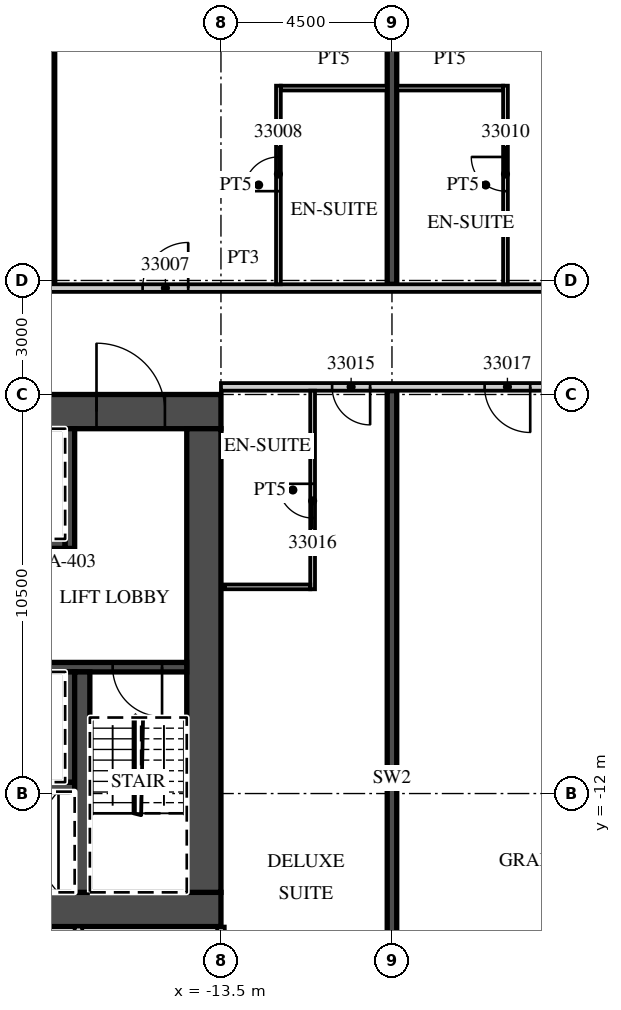
"""IFC4 building model, lengths in metres.
Left out: names, types, materials, properties, quantities, classifications, styles, units other than length and angle.
Written with IfcOpenShell. Run it as: python <this file> out.ifc"""

import sys

from ifc_helpers import new_model, si_unit, direction, frame, frame_2d, origin, place, context, subcontext, project, spatial, rectangle, extrude, element, fill, save


model = new_model("IFC4")
c1 = context("Model", 3, precision=1e-05, world=origin(), true_north=direction((0.0, 1.0)))
c2 = subcontext(c1, "Body", "Model", "MODEL_VIEW")
j1 = project(units=[si_unit("LENGTHUNIT", "METRE"), si_unit("PLANEANGLEUNIT", "RADIAN")], contexts=[c1])
p1 = place(None, origin())
s1 = spatial("IfcSite", under=j1, at=p1, CompositionType="ELEMENT")
p2 = place(p1, origin())
s2 = spatial("IfcBuilding", under=s1, at=p2, CompositionType="ELEMENT")
p3 = place(p2, frame((0.0, 0.0, 143.8)))
s3 = spatial("IfcBuildingStorey", under=s2, at=p3, CompositionType="ELEMENT", Elevation=143.8)
p4 = place(p3, frame((-18.0, 1.4, 0.0), z_axis=(0.0, 0.0, 1.0), x_axis=(0.0, 1.0, 0.0)))
e1 = element("IfcWall", 1, at=p4, inside=s3, PredefinedType="SHEAR", context=c2, shape_type="SweptSolid", body=[
    extrude(rectangle(XDim=18.207, YDim=0.25, at=frame_2d((9.104, 0.0))), origin(), (0.0, 0.0, 1.0), 3.3),
])
p5 = place(p3, frame((-9.0, -21.777, 0.0), z_axis=(0.0, 0.0, 1.0), x_axis=(0.0, 1.0, 0.0)))
e2 = element("IfcWall", 2, at=p5, inside=s3, PredefinedType="SHEAR", context=c2, shape_type="SweptSolid", body=[
    extrude(rectangle(XDim=20.377, YDim=0.25, at=frame_2d((10.188, 0.0))), origin(), (0.0, 0.0, 1.0), 3.3),
])
p6 = place(p3, frame((-9.0, 1.4, 0.0), z_axis=(0.0, 0.0, 1.0), x_axis=(0.0, 1.0, 0.0)))
e3 = element("IfcWall", 3, at=p6, inside=s3, PredefinedType="SHEAR", context=c2, shape_type="SweptSolid", body=[
    extrude(rectangle(XDim=19.073, YDim=0.25, at=frame_2d((9.537, 0.0))), origin(), (0.0, 0.0, 1.0), 3.3),
])
p7 = place(p3, frame((-13.5, -22.232, 0.0), z_axis=(0.0, 0.0, 1.0), x_axis=(0.0, 1.0, 0.0)))
e4 = element("IfcWall", 4, at=p7, inside=s3, PredefinedType="PARTITIONING", context=c2, shape_type="SweptSolid", body=[
    extrude(rectangle(XDim=6.732, YDim=0.2, at=frame_2d((3.366, 0.0))), origin(), (0.0, 0.0, 1.0), 3.02),
])
p8 = place(p3, frame((-39.316, 1.3, 0.0), z_axis=(0.0, 0.0, 1.0), x_axis=(1.0, 0.0, 0.0)))
e5 = element("IfcWall", 5, at=p8, inside=s3, PredefinedType="PARTITIONING", context=c2, shape_type="SweptSolid", body=[
    extrude(rectangle(XDim=52.816, YDim=0.2, at=frame_2d((26.408, 0.0))), origin(), (0.0, 0.0, 1.0), 3.02),
])
p9 = place(p8, frame((0.15, 0.0, 0.0)))
e6 = element("IfcOpeningElement", 6, at=p9, cuts=e5, PredefinedType="OPENING", context=c2, shape_type="SweptSolid", body=[
    extrude(rectangle(XDim=0.9, YDim=2.1, at=frame_2d((0.45, 1.05))), frame((0.0, 0.11, 0.0), z_axis=(0.0, -1.0, 0.0), x_axis=(1.0, 0.0, 0.0)), (0.0, 0.0, 1.0), 0.22),
])
p10 = place(p8, frame((5.754, 0.0, 0.0)))
e7 = element("IfcOpeningElement", 7, at=p10, cuts=e5, PredefinedType="OPENING", context=c2, shape_type="SweptSolid", body=[
    extrude(rectangle(XDim=1.2, YDim=2.1, at=frame_2d((0.6, 1.05))), frame((0.0, 0.11, 0.0), z_axis=(0.0, -1.0, 0.0), x_axis=(1.0, 0.0, 0.0)), (0.0, 0.0, 1.0), 0.22),
])
p11 = place(p8, frame((14.754, 0.0, 0.0)))
e8 = element("IfcOpeningElement", 8, at=p11, cuts=e5, PredefinedType="OPENING", context=c2, shape_type="SweptSolid", body=[
    extrude(rectangle(XDim=1.2, YDim=2.1, at=frame_2d((0.6, 1.05))), frame((0.0, 0.11, 0.0), z_axis=(0.0, -1.0, 0.0), x_axis=(1.0, 0.0, 0.0)), (0.0, 0.0, 1.0), 0.22),
])
p12 = place(p8, frame((23.754, 0.0, 0.0)))
e9 = element("IfcOpeningElement", 9, at=p12, cuts=e5, PredefinedType="OPENING", context=c2, shape_type="SweptSolid", body=[
    extrude(rectangle(XDim=1.2, YDim=2.1, at=frame_2d((0.6, 1.05))), frame((0.0, 0.11, 0.0), z_axis=(0.0, -1.0, 0.0), x_axis=(1.0, 0.0, 0.0)), (0.0, 0.0, 1.0), 0.22),
])
p13 = place(p8, frame((35.678, 0.0, 0.0)))
e10 = element("IfcOpeningElement", 10, at=p13, cuts=e5, PredefinedType="OPENING", context=c2, shape_type="SweptSolid", body=[
    extrude(rectangle(XDim=1.2, YDim=2.1, at=frame_2d((0.6, 1.05))), frame((0.0, 0.11, 0.0), z_axis=(0.0, -1.0, 0.0), x_axis=(1.0, 0.0, 0.0)), (0.0, 0.0, 1.0), 0.22),
])
p14 = place(p8, frame((44.678, 0.0, 0.0)))
e11 = element("IfcOpeningElement", 11, at=p14, cuts=e5, PredefinedType="OPENING", context=c2, shape_type="SweptSolid", body=[
    extrude(rectangle(XDim=1.2, YDim=2.1, at=frame_2d((0.6, 1.05))), frame((0.0, 0.11, 0.0), z_axis=(0.0, -1.0, 0.0), x_axis=(1.0, 0.0, 0.0)), (0.0, 0.0, 1.0), 0.22),
])
p15 = place(p8, frame((51.241, 0.0, 0.0)))
e12 = element("IfcOpeningElement", 12, at=p15, cuts=e5, PredefinedType="OPENING", context=c2, shape_type="SweptSolid", body=[
    extrude(rectangle(XDim=1.0, YDim=2.1, at=frame_2d((0.5, 1.05))), frame((0.0, 0.11, 0.0), z_axis=(0.0, -1.0, 0.0), x_axis=(1.0, 0.0, 0.0)), (0.0, 0.0, 1.0), 0.22),
])
p16 = place(p3, frame((-11.988, 1.4, 0.0), z_axis=(0.0, 0.0, 1.0), x_axis=(0.0, 1.0, 0.0)))
e13 = element("IfcWall", 13, at=p16, inside=s3, PredefinedType="PARTITIONING", context=c2, shape_type="SweptSolid", body=[
    extrude(rectangle(XDim=5.225, YDim=0.125, at=frame_2d((2.613, 0.0))), origin(), (0.0, 0.0, 1.0), 3.02),
])
p17 = place(p16, frame((2.45, 0.0, 0.0)))
e14 = element("IfcOpeningElement", 14, at=p17, cuts=e13, PredefinedType="OPENING", context=c2, shape_type="SweptSolid", body=[
    extrude(rectangle(XDim=0.9, YDim=2.1, at=frame_2d((0.45, 1.05))), frame((0.0, 0.073, 0.0), z_axis=(0.0, -1.0, 0.0), x_axis=(1.0, 0.0, 0.0)), (0.0, 0.0, 1.0), 0.145),
])
p18 = place(p3, frame((-11.925, 6.562, 0.0), z_axis=(0.0, 0.0, 1.0), x_axis=(1.0, 0.0, 0.0)))
e15 = element("IfcWall", 15, at=p18, inside=s3, PredefinedType="PARTITIONING", context=c2, shape_type="SweptSolid", body=[
    extrude(rectangle(XDim=2.8, YDim=0.125, at=frame_2d((1.4, 0.0))), origin(), (0.0, 0.0, 1.0), 3.02),
])
p19 = place(p3, frame((-6.013, 1.4, 0.0), z_axis=(0.0, 0.0, 1.0), x_axis=(0.0, 1.0, 0.0)))
e16 = element("IfcWall", 16, at=p19, inside=s3, PredefinedType="PARTITIONING", context=c2, shape_type="SweptSolid", body=[
    extrude(rectangle(XDim=5.225, YDim=0.125, at=frame_2d((2.613, 0.0))), origin(), (0.0, 0.0, 1.0), 3.02),
])
p20 = place(p19, frame((2.45, 0.0, 0.0)))
e17 = element("IfcOpeningElement", 17, at=p20, cuts=e16, PredefinedType="OPENING", context=c2, shape_type="SweptSolid", body=[
    extrude(rectangle(XDim=0.9, YDim=2.1, at=frame_2d((0.45, 1.05))), frame((0.0, 0.073, 0.0), z_axis=(0.0, -1.0, 0.0), x_axis=(1.0, 0.0, 0.0)), (0.0, 0.0, 1.0), 0.145),
])
p21 = place(p3, frame((-8.875, 6.562, 0.0), z_axis=(0.0, 0.0, 1.0), x_axis=(1.0, 0.0, 0.0)))
e18 = element("IfcWall", 18, at=p21, inside=s3, PredefinedType="PARTITIONING", context=c2, shape_type="SweptSolid", body=[
    extrude(rectangle(XDim=2.8, YDim=0.125, at=frame_2d((1.4, 0.0))), origin(), (0.0, 0.0, 1.0), 3.02),
])
p22 = place(p3, frame((-13.5, -1.3, 0.0), z_axis=(0.0, 0.0, 1.0), x_axis=(1.0, 0.0, 0.0)))
e19 = element("IfcWall", 19, at=p22, inside=s3, PredefinedType="PARTITIONING", context=c2, shape_type="SweptSolid", body=[
    extrude(rectangle(XDim=60.932, YDim=0.2, at=frame_2d((30.466, 0.0))), origin(), (0.0, 0.0, 1.0), 3.02),
])
p23 = place(p22, frame((2.925, 0.0, 0.0)))
e20 = element("IfcOpeningElement", 20, at=p23, cuts=e19, PredefinedType="OPENING", context=c2, shape_type="SweptSolid", body=[
    extrude(rectangle(XDim=1.0, YDim=2.1, at=frame_2d((0.5, 1.05))), frame((0.0, 0.11, 0.0), z_axis=(0.0, -1.0, 0.0), x_axis=(1.0, 0.0, 0.0)), (0.0, 0.0, 1.0), 0.22),
])
p24 = place(p22, frame((6.938, 0.0, 0.0)))
e21 = element("IfcOpeningElement", 21, at=p24, cuts=e19, PredefinedType="OPENING", context=c2, shape_type="SweptSolid", body=[
    extrude(rectangle(XDim=1.2, YDim=2.1, at=frame_2d((0.6, 1.05))), frame((0.0, 0.11, 0.0), z_axis=(0.0, -1.0, 0.0), x_axis=(1.0, 0.0, 0.0)), (0.0, 0.0, 1.0), 0.22),
])
p25 = place(p22, frame((15.938, 0.0, 0.0)))
e22 = element("IfcOpeningElement", 22, at=p25, cuts=e19, PredefinedType="OPENING", context=c2, shape_type="SweptSolid", body=[
    extrude(rectangle(XDim=1.2, YDim=2.1, at=frame_2d((0.6, 1.05))), frame((0.0, 0.11, 0.0), z_axis=(0.0, -1.0, 0.0), x_axis=(1.0, 0.0, 0.0)), (0.0, 0.0, 1.0), 0.22),
])
p26 = place(p22, frame((24.938, 0.0, 0.0)))
e23 = element("IfcOpeningElement", 23, at=p26, cuts=e19, PredefinedType="OPENING", context=c2, shape_type="SweptSolid", body=[
    extrude(rectangle(XDim=1.2, YDim=2.1, at=frame_2d((0.6, 1.05))), frame((0.0, 0.11, 0.0), z_axis=(0.0, -1.0, 0.0), x_axis=(1.0, 0.0, 0.0)), (0.0, 0.0, 1.0), 0.22),
])
p27 = place(p22, frame((32.075, 0.0, 0.0)))
e24 = element("IfcOpeningElement", 24, at=p27, cuts=e19, PredefinedType="OPENING", context=c2, shape_type="SweptSolid", body=[
    extrude(rectangle(XDim=1.0, YDim=2.1, at=frame_2d((0.5, 1.05))), frame((0.0, 0.11, 0.0), z_axis=(0.0, -1.0, 0.0), x_axis=(1.0, 0.0, 0.0)), (0.0, 0.0, 1.0), 0.22),
])
p28 = place(p22, frame((36.55, 0.0, 0.0)))
e25 = element("IfcOpeningElement", 25, at=p28, cuts=e19, PredefinedType="OPENING", context=c2, shape_type="SweptSolid", body=[
    extrude(rectangle(XDim=1.0, YDim=2.1, at=frame_2d((0.5, 1.05))), frame((0.0, 0.11, 0.0), z_axis=(0.0, -1.0, 0.0), x_axis=(1.0, 0.0, 0.0)), (0.0, 0.0, 1.0), 0.22),
])
p29 = place(p22, frame((42.938, 0.0, 0.0)))
e26 = element("IfcOpeningElement", 26, at=p29, cuts=e19, PredefinedType="OPENING", context=c2, shape_type="SweptSolid", body=[
    extrude(rectangle(XDim=1.2, YDim=2.1, at=frame_2d((0.6, 1.05))), frame((0.0, 0.11, 0.0), z_axis=(0.0, -1.0, 0.0), x_axis=(1.0, 0.0, 0.0)), (0.0, 0.0, 1.0), 0.22),
])
p30 = place(p22, frame((52.425, 0.0, 0.0)))
e27 = element("IfcOpeningElement", 27, at=p30, cuts=e19, PredefinedType="OPENING", context=c2, shape_type="SweptSolid", body=[
    extrude(rectangle(XDim=1.0, YDim=2.1, at=frame_2d((0.5, 1.05))), frame((0.0, 0.11, 0.0), z_axis=(0.0, -1.0, 0.0), x_axis=(1.0, 0.0, 0.0)), (0.0, 0.0, 1.0), 0.22),
])
p31 = place(p22, frame((58.316, 0.0, 0.0)))
e28 = element("IfcOpeningElement", 28, at=p31, cuts=e19, PredefinedType="OPENING", context=c2, shape_type="SweptSolid", body=[
    extrude(rectangle(XDim=1.2, YDim=2.1, at=frame_2d((0.6, 1.05))), frame((0.0, 0.11, 0.0), z_axis=(0.0, -1.0, 0.0), x_axis=(1.0, 0.0, 0.0)), (0.0, 0.0, 1.0), 0.22),
])
p32 = place(p3, frame((-11.088, -6.625, 0.0), z_axis=(0.0, 0.0, 1.0), x_axis=(0.0, 1.0, 0.0)))
e29 = element("IfcWall", 29, at=p32, inside=s3, PredefinedType="PARTITIONING", context=c2, shape_type="SweptSolid", body=[
    extrude(rectangle(XDim=5.225, YDim=0.125, at=frame_2d((2.613, 0.0))), origin(), (0.0, 0.0, 1.0), 3.02),
])
p33 = place(p32, frame((1.875, 0.0, 0.0)))
e30 = element("IfcOpeningElement", 30, at=p33, cuts=e29, PredefinedType="OPENING", context=c2, shape_type="SweptSolid", body=[
    extrude(rectangle(XDim=0.9, YDim=2.1, at=frame_2d((0.45, 1.05))), frame((0.0, 0.073, 0.0), z_axis=(0.0, -1.0, 0.0), x_axis=(1.0, 0.0, 0.0)), (0.0, 0.0, 1.0), 0.145),
])
p34 = place(p3, frame((-13.4, -6.562, 0.0), z_axis=(0.0, 0.0, 1.0), x_axis=(1.0, 0.0, 0.0)))
e31 = element("IfcWall", 31, at=p34, inside=s3, PredefinedType="PARTITIONING", context=c2, shape_type="SweptSolid", body=[
    extrude(rectangle(XDim=2.25, YDim=0.125, at=frame_2d((1.125, 0.0))), origin(), (0.0, 0.0, 1.0), 3.02),
])
p35 = place(p3, frame((-31.5, -1.95, 0.0), z_axis=(0.0, 0.0, 1.0), x_axis=(1.0, 0.0, 0.0)))
e32 = element("IfcWall", 32, at=p35, inside=s3, PredefinedType="SHEAR", context=c2, shape_type="SweptSolid", body=[
    extrude(rectangle(XDim=18.0, YDim=0.9, at=frame_2d((9.0, 0.0))), origin(), (0.0, 0.0, 1.0), 3.02),
])
p36 = place(p35, frame((14.725, 0.0, 0.0)))
e33 = element("IfcOpeningElement", 33, at=p36, cuts=e32, PredefinedType="OPENING", context=c2, shape_type="SweptSolid", body=[
    extrude(rectangle(XDim=1.8, YDim=2.1, at=frame_2d((0.9, 1.05))), frame((0.0, 0.46, 0.0), z_axis=(0.0, -1.0, 0.0), x_axis=(1.0, 0.0, 0.0)), (0.0, 0.0, 1.0), 0.92),
])
p37 = place(p3, frame((-20.3, -15.05, 0.0), z_axis=(0.0, 0.0, 1.0), x_axis=(1.0, 0.0, 0.0)))
e34 = element("IfcWall", 34, at=p37, inside=s3, PredefinedType="SHEAR", context=c2, shape_type="SweptSolid", body=[
    extrude(rectangle(XDim=6.8, YDim=0.9, at=frame_2d((3.4, 0.0))), origin(), (0.0, 0.0, 1.0), 3.02),
])
p38 = place(p37, frame((0.875, 0.0, 0.0)))
e35 = element("IfcOpeningElement", 35, at=p38, cuts=e34, PredefinedType="OPENING", context=c2, shape_type="SweptSolid", body=[
    extrude(rectangle(XDim=1.2, YDim=2.1, at=frame_2d((0.6, 1.05))), frame((0.0, 0.46, 0.0), z_axis=(0.0, -1.0, 0.0), x_axis=(1.0, 0.0, 0.0)), (0.0, 0.0, 1.0), 0.92),
])
p39 = place(p3, frame((-13.95, -14.6, 0.0), z_axis=(0.0, 0.0, 1.0), x_axis=(0.0, 1.0, 0.0)))
e36 = element("IfcWall", 36, at=p39, inside=s3, PredefinedType="SHEAR", context=c2, shape_type="SweptSolid", body=[
    extrude(rectangle(XDim=12.2, YDim=0.9, at=frame_2d((6.1, 0.0))), origin(), (0.0, 0.0, 1.0), 3.02),
])
p40 = place(p3, frame((-30.6, -5.425, 0.0), z_axis=(0.0, 0.0, 1.0), x_axis=(1.0, 0.0, 0.0)))
e37 = element("IfcWall", 37, at=p40, inside=s3, PredefinedType="SHEAR", context=c2, shape_type="SweptSolid", body=[
    extrude(rectangle(XDim=13.0, YDim=0.25, at=frame_2d((6.5, 0.0))), origin(), (0.0, 0.0, 1.0), 3.02),
])
p41 = place(p3, frame((-17.475, -5.55, 0.0), z_axis=(0.0, 0.0, 1.0), x_axis=(0.0, 1.0, 0.0)))
e38 = element("IfcWall", 38, at=p41, inside=s3, PredefinedType="SHEAR", context=c2, shape_type="SweptSolid", body=[
    extrude(rectangle(XDim=3.15, YDim=0.25, at=frame_2d((1.575, 0.0))), origin(), (0.0, 0.0, 1.0), 3.02),
])
p42 = place(p3, frame((-30.6, -8.675, 0.0), z_axis=(0.0, 0.0, 1.0), x_axis=(1.0, 0.0, 0.0)))
e39 = element("IfcWall", 39, at=p42, inside=s3, PredefinedType="SHEAR", context=c2, shape_type="SweptSolid", body=[
    extrude(rectangle(XDim=16.2, YDim=0.25, at=frame_2d((8.1, 0.0))), origin(), (0.0, 0.0, 1.0), 3.02),
])
p43 = place(p42, frame((0.6, 0.0, 0.0)))
e40 = element("IfcOpeningElement", 40, at=p43, cuts=e39, PredefinedType="OPENING", context=c2, shape_type="SweptSolid", body=[
    extrude(rectangle(XDim=1.2, YDim=2.1, at=frame_2d((0.6, 1.05))), frame((0.0, 0.135, 0.0), z_axis=(0.0, -1.0, 0.0), x_axis=(1.0, 0.0, 0.0)), (0.0, 0.0, 1.0), 0.27),
])
p44 = place(p42, frame((3.25, 0.0, 0.0)))
e41 = element("IfcOpeningElement", 41, at=p44, cuts=e39, PredefinedType="OPENING", context=c2, shape_type="SweptSolid", body=[
    extrude(rectangle(XDim=1.2, YDim=2.1, at=frame_2d((0.6, 1.05))), frame((0.0, 0.135, 0.0), z_axis=(0.0, -1.0, 0.0), x_axis=(1.0, 0.0, 0.0)), (0.0, 0.0, 1.0), 0.27),
])
p45 = place(p42, frame((5.9, 0.0, 0.0)))
e42 = element("IfcOpeningElement", 42, at=p45, cuts=e39, PredefinedType="OPENING", context=c2, shape_type="SweptSolid", body=[
    extrude(rectangle(XDim=1.2, YDim=2.1, at=frame_2d((0.6, 1.05))), frame((0.0, 0.135, 0.0), z_axis=(0.0, -1.0, 0.0), x_axis=(1.0, 0.0, 0.0)), (0.0, 0.0, 1.0), 0.27),
])
p46 = place(p42, frame((14.25, 0.0, 0.0)))
e43 = element("IfcOpeningElement", 43, at=p46, cuts=e39, PredefinedType="OPENING", context=c2, shape_type="SweptSolid", body=[
    extrude(rectangle(XDim=1.3, YDim=2.1, at=frame_2d((0.65, 1.05))), frame((0.0, 0.135, 0.0), z_axis=(0.0, -1.0, 0.0), x_axis=(1.0, 0.0, 0.0)), (0.0, 0.0, 1.0), 0.27),
])
p47 = place(p3, frame((-30.6, -11.825, 0.0), z_axis=(0.0, 0.0, 1.0), x_axis=(1.0, 0.0, 0.0)))
e44 = element("IfcWall", 44, at=p47, inside=s3, PredefinedType="SHEAR", context=c2, shape_type="SweptSolid", body=[
    extrude(rectangle(XDim=13.25, YDim=0.25, at=frame_2d((6.625, 0.0))), origin(), (0.0, 0.0, 1.0), 3.02),
])
p48 = place(p3, frame((-17.475, -11.7, 0.0), z_axis=(0.0, 0.0, 1.0), x_axis=(0.0, 1.0, 0.0)))
e45 = element("IfcWall", 45, at=p48, inside=s3, PredefinedType="SHEAR", context=c2, shape_type="SweptSolid", body=[
    extrude(rectangle(XDim=2.9, YDim=0.25, at=frame_2d((1.45, 0.0))), origin(), (0.0, 0.0, 1.0), 3.02),
])
p49 = place(p3, frame((-17.15, -14.6, 0.0), z_axis=(0.0, 0.0, 1.0), x_axis=(0.0, 1.0, 0.0)))
e46 = element("IfcWall", 46, at=p49, inside=s3, PredefinedType="SHEAR", context=c2, shape_type="SweptSolid", body=[
    extrude(rectangle(XDim=5.8, YDim=0.4, at=frame_2d((2.9, 0.0))), origin(), (0.0, 0.0, 1.0), 3.02),
])
p50 = place(p3, frame((-17.25, -17.7, 0.0), z_axis=(0.0, 0.0, 1.0), x_axis=(0.0, 1.0, 0.0)))
e47 = element("IfcWall", 47, at=p50, inside=s3, PredefinedType="PARTITIONING", context=c2, shape_type="SweptSolid", body=[
    extrude(rectangle(XDim=2.2, YDim=0.2, at=frame_2d((1.1, 0.0))), origin(), (0.0, 0.0, 1.0), 3.02),
])
p51 = place(p12, origin())
e48 = element("IfcDoor", 48, at=p51, inside=s3, OperationType="SINGLE_SWING_RIGHT", PredefinedType="DOOR", context=c2, shape_type="SweptSolid", body=[
    extrude(rectangle(XDim=1.2, YDim=2.1, at=frame_2d((0.6, 1.05))), frame((0.0, 0.025, 0.0), z_axis=(0.0, -1.0, 0.0), x_axis=(1.0, 0.0, 0.0)), (0.0, 0.0, 1.0), 0.05),
])
fill(e9, e48)
p52 = place(p17, origin())
e49 = element("IfcDoor", 49, at=p52, inside=s3, OperationType="SINGLE_SWING_LEFT", PredefinedType="DOOR", context=c2, shape_type="SweptSolid", body=[
    extrude(rectangle(XDim=0.9, YDim=2.1, at=frame_2d((0.45, 1.05))), frame((0.0, 0.025, 0.0), z_axis=(0.0, -1.0, 0.0), x_axis=(1.0, 0.0, 0.0)), (0.0, 0.0, 1.0), 0.05),
])
fill(e14, e49)
p53 = place(p20, origin())
e50 = element("IfcDoor", 50, at=p53, inside=s3, OperationType="SINGLE_SWING_RIGHT", PredefinedType="DOOR", context=c2, shape_type="SweptSolid", body=[
    extrude(rectangle(XDim=0.9, YDim=2.1, at=frame_2d((0.45, 1.05))), frame((0.0, 0.025, 0.0), z_axis=(0.0, -1.0, 0.0), x_axis=(1.0, 0.0, 0.0)), (0.0, 0.0, 1.0), 0.05),
])
fill(e17, e50)
p54 = place(p23, origin())
e51 = element("IfcDoor", 51, at=p54, inside=s3, OperationType="SINGLE_SWING_RIGHT", PredefinedType="DOOR", context=c2, shape_type="SweptSolid", body=[
    extrude(rectangle(XDim=1.0, YDim=2.1, at=frame_2d((0.5, 1.05))), frame((0.0, 0.025, 0.0), z_axis=(0.0, -1.0, 0.0), x_axis=(1.0, 0.0, 0.0)), (0.0, 0.0, 1.0), 0.05),
])
fill(e20, e51)
p55 = place(p33, origin())
e52 = element("IfcDoor", 52, at=p55, inside=s3, OperationType="SINGLE_SWING_RIGHT", PredefinedType="DOOR", context=c2, shape_type="SweptSolid", body=[
    extrude(rectangle(XDim=0.9, YDim=2.1, at=frame_2d((0.45, 1.05))), frame((0.0, 0.025, 0.0), z_axis=(0.0, -1.0, 0.0), x_axis=(1.0, 0.0, 0.0)), (0.0, 0.0, 1.0), 0.05),
])
fill(e30, e52)
p56 = place(p24, origin())
e53 = element("IfcDoor", 53, at=p56, inside=s3, OperationType="SINGLE_SWING_RIGHT", PredefinedType="DOOR", context=c2, shape_type="SweptSolid", body=[
    extrude(rectangle(XDim=1.2, YDim=2.1, at=frame_2d((0.6, 1.05))), frame((0.0, 0.025, 0.0), z_axis=(0.0, -1.0, 0.0), x_axis=(1.0, 0.0, 0.0)), (0.0, 0.0, 1.0), 0.05),
])
fill(e21, e53)
p57 = place(p36, origin())
e54 = element("IfcDoor", 54, at=p57, inside=s3, OperationType="DOUBLE_DOOR_DOUBLE_SWING", PredefinedType="DOOR", context=c2, shape_type="SweptSolid", body=[
    extrude(rectangle(XDim=1.8, YDim=2.1, at=frame_2d((0.9, 1.05))), frame((0.0, 0.025, 0.0), z_axis=(0.0, -1.0, 0.0), x_axis=(1.0, 0.0, 0.0)), (0.0, 0.0, 1.0), 0.05),
])
fill(e33, e54)
p58 = place(p46, origin())
e55 = element("IfcDoor", 55, at=p58, inside=s3, OperationType="SINGLE_SWING_RIGHT", PredefinedType="DOOR", context=c2, shape_type="SweptSolid", body=[
    extrude(rectangle(XDim=1.3, YDim=2.1, at=frame_2d((0.65, 1.05))), frame((0.0, 0.025, 0.0), z_axis=(0.0, -1.0, 0.0), x_axis=(1.0, 0.0, 0.0)), (0.0, 0.0, 1.0), 0.05),
])
fill(e43, e55)
save(model, sys.argv[1])
